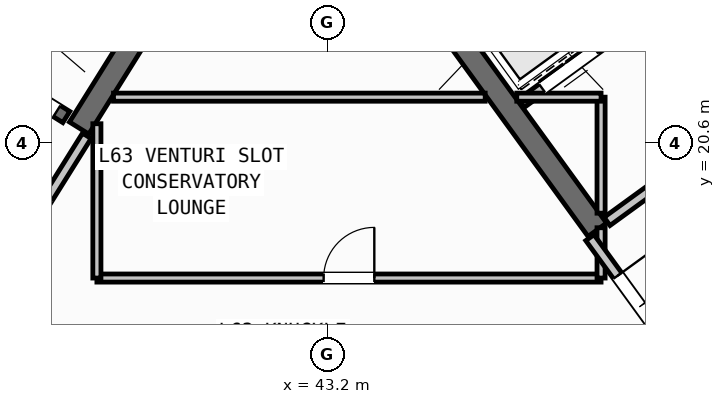
"""IFC4 building model, lengths in metres.
Left out: names, types, materials, properties, quantities, classifications, styles, units other than length and angle.
Written with IfcOpenShell. Run it as: python <this file> out.ifc"""

import sys

from ifc_helpers import new_model, si_unit, direction, frame, frame_2d, origin, place, context, subcontext, project, spatial, rectangle, extrude, source, transform, mapped, element, fill, save


model = new_model("IFC4")
c1 = context("Model", 3, precision=1e-05, world=origin(), true_north=direction((0.0, 1.0)))
c2 = subcontext(c1, "Body", "Model", "MODEL_VIEW")
j1 = project(units=[si_unit("LENGTHUNIT", "METRE"), si_unit("PLANEANGLEUNIT", "RADIAN")], contexts=[c1])
p1 = place(None, origin())
s1 = spatial("IfcSite", under=j1, at=p1, CompositionType="ELEMENT")
p2 = place(p1, origin())
s2 = spatial("IfcBuilding", under=s1, at=p2, CompositionType="ELEMENT")
p3 = place(p2, frame((0.0, 0.0, 251.1)))
s3 = spatial("IfcBuildingStorey", under=s2, at=p3, CompositionType="ELEMENT", Elevation=251.1)
p4 = place(p3, frame((40.221, 23.965, 0.0), z_axis=(0.0, 0.0, 1.0), x_axis=(-0.529902075036, -0.848058836916, 0.0)))
e1 = element("IfcWall", 1, at=p4, inside=s3, PredefinedType="SHEAR", context=c2, shape_type="SweptSolid", body=[
    extrude(rectangle(XDim=3.625, YDim=0.45, at=frame_2d((1.812, 0.0))), origin(), (0.0, 0.0, 1.0), 3.32),
])
p5 = place(p3, frame((48.526, 18.884, 0.0), z_axis=(0.0, 0.0, 1.0), x_axis=(-0.587774812919, 0.809024578921, 0.0)))
e2 = element("IfcWall", 2, at=p5, inside=s3, PredefinedType="SHEAR", context=c2, shape_type="SweptSolid", body=[
    extrude(rectangle(XDim=6.475, YDim=0.45, at=frame_2d((3.238, 0.0))), origin(), (0.0, 0.0, 1.0), 3.32),
])
p6 = place(p3, frame((38.046, 21.108, 0.0), z_axis=(0.0, 0.0, 1.0), x_axis=(-0.848054434086, 0.529909121291, 0.0)))
e3 = element("IfcWall", 3, at=p6, inside=s3, PredefinedType="SHEAR", context=c2, shape_type="SweptSolid", body=[
    extrude(rectangle(XDim=7.33, YDim=0.26, at=frame_2d((3.665, 0.0))), origin(), (0.0, 0.0, 1.0), 3.32),
])
p7 = place(p6, frame((0.22, 0.0, 0.0)))
e4 = element("IfcOpeningElement", 4, at=p7, cuts=e3, PredefinedType="OPENING", context=c2, shape_type="SweptSolid", body=[
    extrude(rectangle(XDim=1.1, YDim=2.1, at=frame_2d((0.55, 1.05))), frame((0.0, 0.14, 0.0), z_axis=(0.0, -1.0, 0.0), x_axis=(1.0, 0.0, 0.0)), (0.0, 0.0, 1.0), 0.28),
])
p8 = place(p3, frame((47.025, 21.378, 0.0), z_axis=(0.0, 0.0, 1.0), x_axis=(0.809052869724, 0.587735870941, 0.0)))
e5 = element("IfcWall", 5, at=p8, inside=s3, PredefinedType="STANDARD", context=c2, shape_type="SweptSolid", body=[
    extrude(rectangle(XDim=3.498, YDim=0.2, at=frame_2d((1.749, 0.0))), origin(), (0.0, 0.0, 1.0), 3.31),
])
p9 = place(p8, frame((0.508, 0.0, 0.0)))
e6 = element("IfcOpeningElement", 6, at=p9, cuts=e5, PredefinedType="OPENING", context=c2, shape_type="SweptSolid", body=[
    extrude(rectangle(XDim=1.3, YDim=2.2, at=frame_2d((0.65, 1.1))), frame((0.0, 0.11, 0.0), z_axis=(0.0, -1.0, 0.0), x_axis=(1.0, 0.0, 0.0)), (0.0, 0.0, 1.0), 0.22),
])
p10 = place(p3, frame((48.718, 19.048, 0.0), z_axis=(0.0, 0.0, 1.0), x_axis=(0.809017261719, 0.587784884325, 0.0)))
e7 = element("IfcWall", 7, at=p10, inside=s3, PredefinedType="STANDARD", context=c2, shape_type="SweptSolid", body=[
    extrude(rectangle(XDim=5.818, YDim=0.2, at=frame_2d((2.909, 0.0))), origin(), (0.0, 0.0, 1.0), 3.31),
])
p11 = place(p10, frame((2.598, 0.0, 0.0)))
e8 = element("IfcOpeningElement", 8, at=p11, cuts=e7, PredefinedType="OPENING", context=c2, shape_type="SweptSolid", body=[
    extrude(rectangle(XDim=1.15, YDim=2.1, at=frame_2d((0.575, 1.05))), frame((0.0, 0.11, 0.0), z_axis=(0.0, -1.0, 0.0), x_axis=(1.0, 0.0, 0.0)), (0.0, 0.0, 1.0), 0.22),
])
p12 = place(p3, frame((38.451, 20.737, 0.0), z_axis=(0.0, 0.0, 1.0), x_axis=(-0.529924799939, -0.848044637038, 0.0)))
e9 = element("IfcWall", 9, at=p12, inside=s3, PredefinedType="STANDARD", context=c2, shape_type="SweptSolid", body=[
    extrude(rectangle(XDim=2.96, YDim=0.2, at=frame_2d((1.48, 0.0))), origin(), (0.0, 0.0, 1.0), 3.31),
])
p13 = place(p12, frame((1.46, 0.0, 0.0)))
e10 = element("IfcOpeningElement", 10, at=p13, cuts=e9, PredefinedType="OPENING", context=c2, shape_type="SweptSolid", body=[
    extrude(rectangle(XDim=0.86, YDim=2.05, at=frame_2d((0.43, 1.025))), frame((0.0, 0.11, 0.0), z_axis=(0.0, -1.0, 0.0), x_axis=(1.0, 0.0, 0.0)), (0.0, 0.0, 1.0), 0.22),
])
p14 = place(p3, frame((38.65, 17.93, 0.0), z_axis=(0.0, 0.0, 1.0), x_axis=(1.0, 0.0, 0.0)))
e11 = element("IfcWall", 11, at=p14, inside=s3, PredefinedType="PARTITIONING", context=c2, shape_type="SweptSolid", body=[
    extrude(rectangle(XDim=9.95, YDim=0.16, at=frame_2d((4.975, 0.0))), origin(), (0.0, 0.0, 1.0), 3.31),
])
p15 = place(p14, frame((4.475, 0.0, 0.0)))
e12 = element("IfcOpeningElement", 12, at=p15, cuts=e11, PredefinedType="OPENING", context=c2, shape_type="SweptSolid", body=[
    extrude(rectangle(XDim=1.0, YDim=2.1, at=frame_2d((0.5, 1.05))), frame((0.0, 0.09, 0.0), z_axis=(0.0, -1.0, 0.0), x_axis=(1.0, 0.0, 0.0)), (0.0, 0.0, 1.0), 0.18),
])
p16 = place(p3, frame((38.65, 17.93, 0.0), z_axis=(0.0, 0.0, 1.0), x_axis=(0.0, 1.0, 0.0)))
e13 = element("IfcWall", 13, at=p16, inside=s3, PredefinedType="PARTITIONING", context=c2, shape_type="SweptSolid", body=[
    extrude(rectangle(XDim=3.046, YDim=0.16, at=frame_2d((1.523, 0.0))), origin(), (0.0, 0.0, 1.0), 3.31),
])
p17 = place(p3, frame((48.6, 17.93, 0.0), z_axis=(0.0, 0.0, 1.0), x_axis=(0.0, 1.0, 0.0)))
e14 = element("IfcWall", 14, at=p17, inside=s3, PredefinedType="PARTITIONING", context=c2, shape_type="SweptSolid", body=[
    extrude(rectangle(XDim=0.993, YDim=0.16, at=frame_2d((0.496, 0.0))), origin(), (0.0, 0.0, 1.0), 3.31),
])
p18 = place(p3, frame((48.6, 19.21, 0.0), z_axis=(0.0, 0.0, 1.0), x_axis=(0.0, 1.0, 0.0)))
e15 = element("IfcWall", 15, at=p18, inside=s3, PredefinedType="PARTITIONING", context=c2, shape_type="SweptSolid", body=[
    extrude(rectangle(XDim=2.29, YDim=0.16, at=frame_2d((1.145, 0.0))), origin(), (0.0, 0.0, 1.0), 3.31),
])
p19 = place(p3, frame((38.978, 21.5, 0.0), z_axis=(0.0, 0.0, 1.0), x_axis=(1.0, 0.0, 0.0)))
e16 = element("IfcWall", 16, at=p19, inside=s3, PredefinedType="PARTITIONING", context=c2, shape_type="SweptSolid", body=[
    extrude(rectangle(XDim=7.336, YDim=0.16, at=frame_2d((3.668, 0.0))), origin(), (0.0, 0.0, 1.0), 3.31),
])
p20 = place(p3, frame((46.936, 21.5, 0.0), z_axis=(0.0, 0.0, 1.0), x_axis=(1.0, 0.0, 0.0)))
e17 = element("IfcWall", 17, at=p20, inside=s3, PredefinedType="PARTITIONING", context=c2, shape_type="SweptSolid", body=[
    extrude(rectangle(XDim=1.664, YDim=0.16, at=frame_2d((0.832, 0.0))), origin(), (0.0, 0.0, 1.0), 3.31),
])
p21 = place(p3, frame((50.119, 16.333, 0.0), z_axis=(0.0, 0.0, 1.0), x_axis=(-0.587749856981, 0.809042709391, 0.0)))
e18 = element("IfcWall", 18, at=p21, inside=s3, PredefinedType="STANDARD", context=c2, shape_type="SweptSolid", body=[
    extrude(rectangle(XDim=2.96, YDim=0.2, at=frame_2d((1.48, 0.0))), origin(), (0.0, 0.0, 1.0), 3.31),
])
p22 = place(p21, frame((0.53, 0.0, 0.0)))
e19 = element("IfcOpeningElement", 19, at=p22, cuts=e18, PredefinedType="OPENING", context=c2, shape_type="SweptSolid", body=[
    extrude(rectangle(XDim=1.5, YDim=2.15, at=frame_2d((0.75, 1.075))), frame((0.0, 0.11, 0.0), z_axis=(0.0, -1.0, 0.0), x_axis=(1.0, 0.0, 0.0)), (0.0, 0.0, 1.0), 0.22),
])
m1 = source(origin(), c2, "Body", "SweptSolid", [
    extrude(rectangle(XDim=1.1, YDim=2.1, at=frame_2d((0.55, 1.05))), frame((0.0, 0.025, 0.0), z_axis=(0.0, -1.0, 0.0), x_axis=(1.0, 0.0, 0.0)), (0.0, 0.0, 1.0), 0.05),
])
p23 = place(p7, origin())
e20 = element("IfcDoor", 20, at=p23, inside=s3, OperationType="SINGLE_SWING_RIGHT", PredefinedType="DOOR", context=c2, shape_type="MappedRepresentation", body=[
    mapped(m1, transform((0.0, 0.0, 0.0), scale=1.0)),
])
fill(e4, e20)
m2 = source(origin(), c2, "Body", "SweptSolid", [
    extrude(rectangle(XDim=1.3, YDim=2.2, at=frame_2d((0.65, 1.1))), frame((0.0, 0.025, 0.0), z_axis=(0.0, -1.0, 0.0), x_axis=(1.0, 0.0, 0.0)), (0.0, 0.0, 1.0), 0.05),
])
p24 = place(p9, origin())
e21 = element("IfcDoor", 21, at=p24, inside=s3, OperationType="DOUBLE_DOOR_SLIDING", PredefinedType="DOOR", context=c2, shape_type="MappedRepresentation", body=[
    mapped(m2, transform((0.0, 0.0, 0.0), scale=1.0)),
])
fill(e6, e21)
m3 = source(origin(), c2, "Body", "SweptSolid", [
    extrude(rectangle(XDim=1.0, YDim=2.1, at=frame_2d((0.5, 1.05))), frame((0.0, 0.025, 0.0), z_axis=(0.0, -1.0, 0.0), x_axis=(1.0, 0.0, 0.0)), (0.0, 0.0, 1.0), 0.05),
])
p25 = place(p15, origin())
e22 = element("IfcDoor", 22, at=p25, inside=s3, OperationType="SINGLE_SWING_RIGHT", PredefinedType="DOOR", context=c2, shape_type="MappedRepresentation", body=[
    mapped(m3, transform((0.0, 0.0, 0.0), scale=1.0)),
])
fill(e12, e22)
m4 = source(origin(), c2, "Body", "SweptSolid", [
    extrude(rectangle(XDim=1.5, YDim=2.15, at=frame_2d((0.75, 1.075))), frame((0.0, 0.025, 0.0), z_axis=(0.0, -1.0, 0.0), x_axis=(1.0, 0.0, 0.0)), (0.0, 0.0, 1.0), 0.05),
])
p26 = place(p22, frame((1.5, 0.0, 0.0), z_axis=(0.0, 0.0, 1.0), x_axis=(-1.0, 0.0, 0.0)))
e23 = element("IfcDoor", 23, at=p26, inside=s3, OperationType="DOUBLE_DOOR_SINGLE_SWING", PredefinedType="DOOR", context=c2, shape_type="MappedRepresentation", body=[
    mapped(m4, transform((0.0, 0.0, 0.0), scale=1.0)),
])
fill(e19, e23)
save(model, sys.argv[1])
